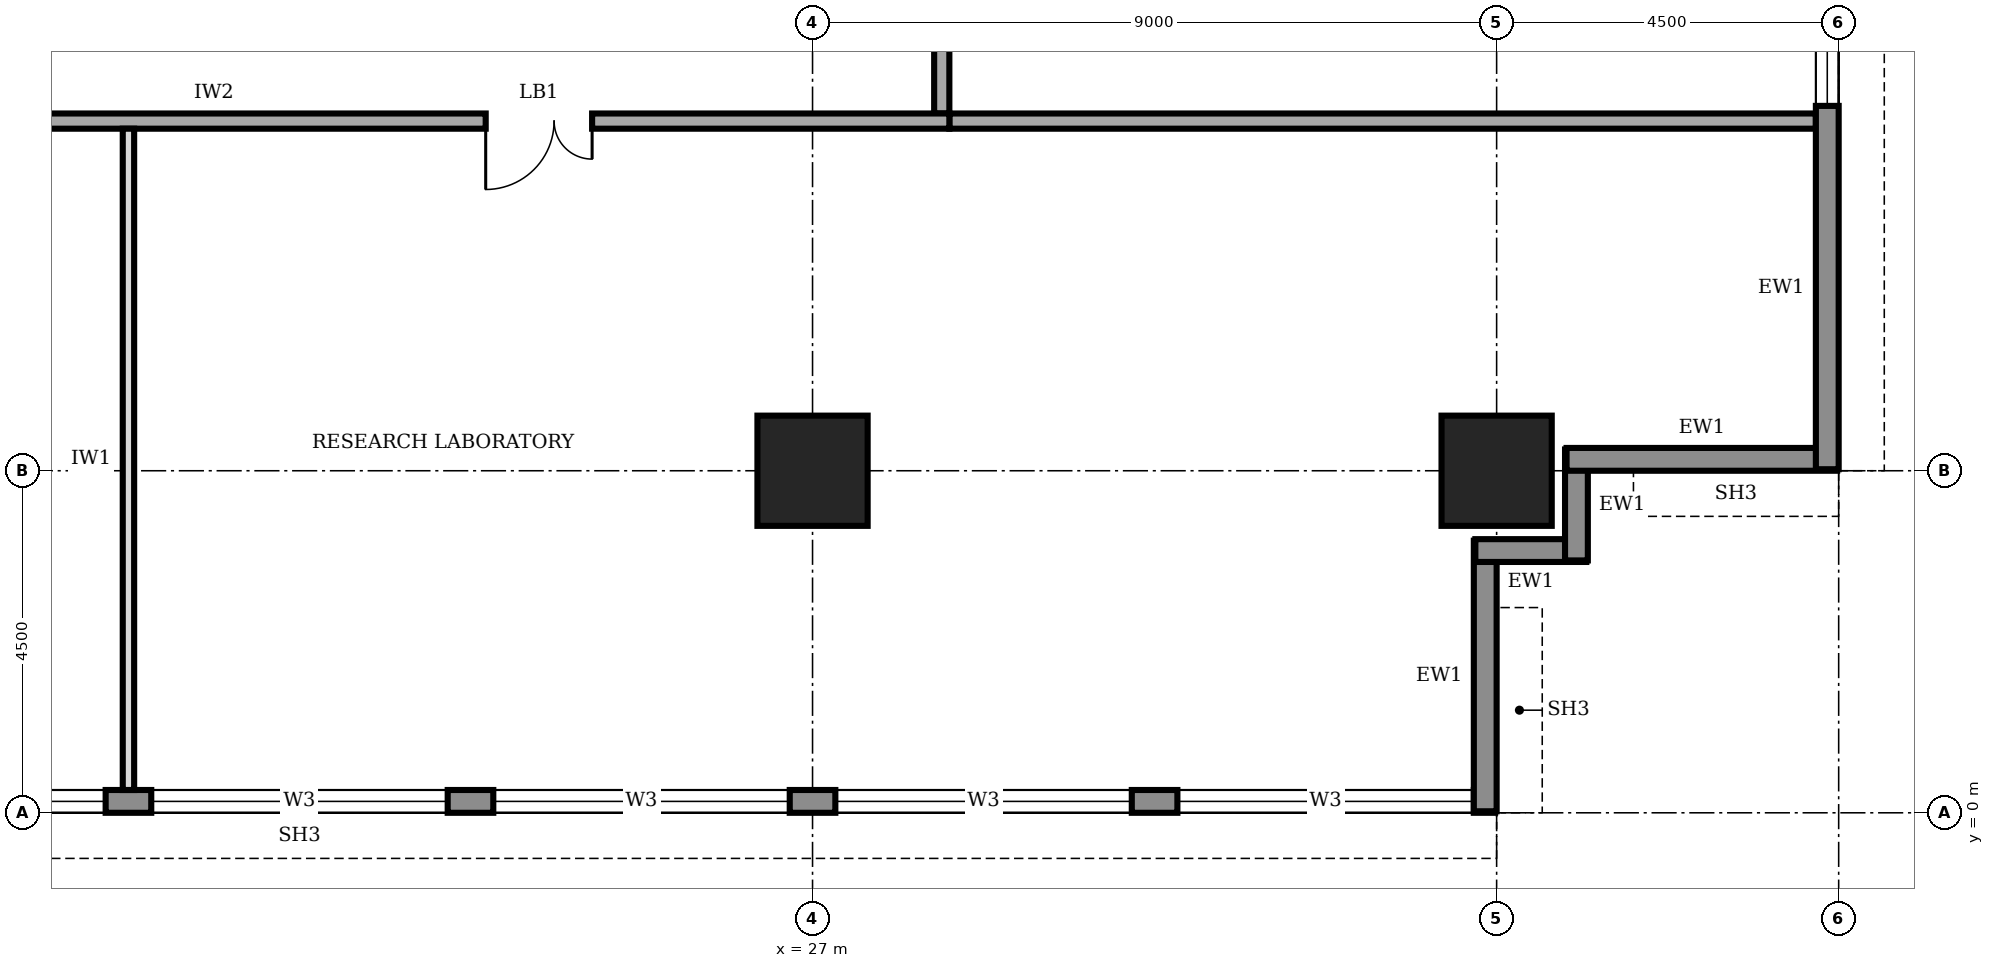
"""IFC4 building model, lengths in metres.
Left out: names, types, materials, properties, quantities, classifications, styles, units other than length and angle.
Written with IfcOpenShell. Run it as: python <this file> out.ifc"""

import sys

from ifc_helpers import new_model, si_unit, direction, frame, frame_2d, origin, origin_2d, place, context, subcontext, project, spatial, rectangle, extrude, element, fill, save


model = new_model("IFC4")
c1 = context("Model", 3, precision=1e-05, world=origin(), true_north=direction((0.0, 1.0)))
c2 = subcontext(c1, "Body", "Model", "MODEL_VIEW")
j1 = project(units=[si_unit("LENGTHUNIT", "METRE"), si_unit("PLANEANGLEUNIT", "RADIAN")], contexts=[c1])
p1 = place(None, origin())
s1 = spatial("IfcSite", under=j1, at=p1, CompositionType="ELEMENT")
p2 = place(p1, origin())
s2 = spatial("IfcBuilding", under=s1, at=p2, CompositionType="ELEMENT")
p3 = place(p2, frame((0.0, 0.0, 257.0)))
s3 = spatial("IfcBuildingStorey", under=s2, at=p3, CompositionType="ELEMENT", Elevation=257.0)
for number, where, z_axis, x_axis in (
    (1, (27.0, 4.5, 0.0), (0.0, 0.0, 1.0), (1.0, 0.0, 0.0)),
    (2, (36.0, 4.5, 0.0), (0.0, 0.0, 1.0), (1.0, 0.0, 0.0)),
):
    element("IfcColumn", number, at=place(p3, frame(where, z_axis=z_axis, x_axis=x_axis)), inside=s3, PredefinedType="COLUMN", context=c2, shape_type="SweptSolid", body=[
        extrude(rectangle(XDim=1.45, YDim=1.45, at=origin_2d()), origin(), (0.0, 0.0, 1.0), 4.0),
    ])
p4 = place(p3, frame((4.52, 0.15, 0.0), z_axis=(0.0, 0.0, 1.0), x_axis=(1.0, 0.0, 0.0)))
e3 = element("IfcWall", 3, at=p4, inside=s3, PredefinedType="STANDARD", context=c2, shape_type="SweptSolid", body=[
    extrude(rectangle(XDim=31.46, YDim=0.3, at=frame_2d((15.73, 0.0))), origin(), (0.0, 0.0, 1.0), 3.75),
])
p5 = place(p4, frame((4.78, 0.0, 0.95)))
e4 = element("IfcOpeningElement", 4, at=p5, cuts=e3, PredefinedType="OPENING", context=c2, shape_type="SweptSolid", body=[
    extrude(rectangle(XDim=3.9, YDim=1.8, at=frame_2d((1.95, 0.9))), frame((0.0, 0.16, 0.0), z_axis=(0.0, -1.0, 0.0), x_axis=(1.0, 0.0, 0.0)), (0.0, 0.0, 1.0), 0.32),
])
p6 = place(p4, frame((9.28, 0.0, 0.95)))
e5 = element("IfcOpeningElement", 5, at=p6, cuts=e3, PredefinedType="OPENING", context=c2, shape_type="SweptSolid", body=[
    extrude(rectangle(XDim=3.9, YDim=1.8, at=frame_2d((1.95, 0.9))), frame((0.0, 0.16, 0.0), z_axis=(0.0, -1.0, 0.0), x_axis=(1.0, 0.0, 0.0)), (0.0, 0.0, 1.0), 0.32),
])
p7 = place(p4, frame((13.78, 0.0, 0.95)))
e6 = element("IfcOpeningElement", 6, at=p7, cuts=e3, PredefinedType="OPENING", context=c2, shape_type="SweptSolid", body=[
    extrude(rectangle(XDim=3.9, YDim=1.8, at=frame_2d((1.95, 0.9))), frame((0.0, 0.16, 0.0), z_axis=(0.0, -1.0, 0.0), x_axis=(1.0, 0.0, 0.0)), (0.0, 0.0, 1.0), 0.32),
])
p8 = place(p4, frame((18.28, 0.0, 0.95)))
e7 = element("IfcOpeningElement", 7, at=p8, cuts=e3, PredefinedType="OPENING", context=c2, shape_type="SweptSolid", body=[
    extrude(rectangle(XDim=3.9, YDim=1.8, at=frame_2d((1.95, 0.9))), frame((0.0, 0.16, 0.0), z_axis=(0.0, -1.0, 0.0), x_axis=(1.0, 0.0, 0.0)), (0.0, 0.0, 1.0), 0.32),
])
p9 = place(p4, frame((22.78, 0.0, 0.95)))
e8 = element("IfcOpeningElement", 8, at=p9, cuts=e3, PredefinedType="OPENING", context=c2, shape_type="SweptSolid", body=[
    extrude(rectangle(XDim=3.9, YDim=1.8, at=frame_2d((1.95, 0.9))), frame((0.0, 0.16, 0.0), z_axis=(0.0, -1.0, 0.0), x_axis=(1.0, 0.0, 0.0)), (0.0, 0.0, 1.0), 0.32),
])
p10 = place(p4, frame((27.28, 0.0, 0.95)))
e9 = element("IfcOpeningElement", 9, at=p10, cuts=e3, PredefinedType="OPENING", context=c2, shape_type="SweptSolid", body=[
    extrude(rectangle(XDim=3.9, YDim=1.8, at=frame_2d((1.95, 0.9))), frame((0.0, 0.16, 0.0), z_axis=(0.0, -1.0, 0.0), x_axis=(1.0, 0.0, 0.0)), (0.0, 0.0, 1.0), 0.32),
])
p11 = place(p3, frame((35.85, 0.02, 0.0), z_axis=(0.0, 0.0, 1.0), x_axis=(0.0, 1.0, 0.0)))
e10 = element("IfcWall", 10, at=p11, inside=s3, PredefinedType="STANDARD", context=c2, shape_type="SweptSolid", body=[
    extrude(rectangle(XDim=3.56, YDim=0.3, at=frame_2d((1.78, 0.0))), origin(), (0.0, 0.0, 1.0), 2.85),
])
for number, where, z_axis, x_axis in (
    (11, (35.72, 3.45, 0.0), (0.0, 0.0, 1.0), (1.0, 0.0, 0.0)),
    (12, (37.05, 3.32, 0.0), (0.0, 0.0, 1.0), (0.0, 1.0, 0.0)),
):
    element("IfcWall", number, at=place(p3, frame(where, z_axis=z_axis, x_axis=x_axis)), inside=s3, PredefinedType="STANDARD", context=c2, shape_type="SweptSolid", body=[
        extrude(rectangle(XDim=1.46, YDim=0.3, at=frame_2d((0.73, 0.0))), origin(), (0.0, 0.0, 1.0), 3.75),
    ])
p12 = place(p3, frame((36.92, 4.65, 0.0), z_axis=(0.0, 0.0, 1.0), x_axis=(1.0, 0.0, 0.0)))
e13 = element("IfcWall", 13, at=p12, inside=s3, PredefinedType="STANDARD", context=c2, shape_type="SweptSolid", body=[
    extrude(rectangle(XDim=3.56, YDim=0.3, at=frame_2d((1.78, 0.0))), origin(), (0.0, 0.0, 1.0), 2.85),
])
p13 = place(p3, frame((40.35, 4.52, 0.0), z_axis=(0.0, 0.0, 1.0), x_axis=(0.0, 1.0, 0.0)))
e14 = element("IfcWall", 14, at=p13, inside=s3, PredefinedType="STANDARD", context=c2, shape_type="SweptSolid", body=[
    extrude(rectangle(XDim=31.46, YDim=0.3, at=frame_2d((15.73, 0.0))), origin(), (0.0, 0.0, 1.0), 3.75),
])
p14 = place(p13, frame((4.78, 0.0, 0.95)))
e15 = element("IfcOpeningElement", 15, at=p14, cuts=e14, PredefinedType="OPENING", context=c2, shape_type="SweptSolid", body=[
    extrude(rectangle(XDim=3.9, YDim=1.8, at=frame_2d((1.95, 0.9))), frame((0.0, 0.16, 0.0), z_axis=(0.0, -1.0, 0.0), x_axis=(1.0, 0.0, 0.0)), (0.0, 0.0, 1.0), 0.32),
])
p15 = place(p13, frame((9.28, 0.0, 0.95)))
e16 = element("IfcOpeningElement", 16, at=p15, cuts=e14, PredefinedType="OPENING", context=c2, shape_type="SweptSolid", body=[
    extrude(rectangle(XDim=3.9, YDim=1.8, at=frame_2d((1.95, 0.9))), frame((0.0, 0.16, 0.0), z_axis=(0.0, -1.0, 0.0), x_axis=(1.0, 0.0, 0.0)), (0.0, 0.0, 1.0), 0.32),
])
p16 = place(p13, frame((13.78, 0.0, 0.95)))
e17 = element("IfcOpeningElement", 17, at=p16, cuts=e14, PredefinedType="OPENING", context=c2, shape_type="SweptSolid", body=[
    extrude(rectangle(XDim=3.9, YDim=1.8, at=frame_2d((1.95, 0.9))), frame((0.0, 0.16, 0.0), z_axis=(0.0, -1.0, 0.0), x_axis=(1.0, 0.0, 0.0)), (0.0, 0.0, 1.0), 0.32),
])
p17 = place(p13, frame((18.28, 0.0, 0.95)))
e18 = element("IfcOpeningElement", 18, at=p17, cuts=e14, PredefinedType="OPENING", context=c2, shape_type="SweptSolid", body=[
    extrude(rectangle(XDim=3.9, YDim=1.8, at=frame_2d((1.95, 0.9))), frame((0.0, 0.16, 0.0), z_axis=(0.0, -1.0, 0.0), x_axis=(1.0, 0.0, 0.0)), (0.0, 0.0, 1.0), 0.32),
])
p18 = place(p13, frame((22.78, 0.0, 0.95)))
e19 = element("IfcOpeningElement", 19, at=p18, cuts=e14, PredefinedType="OPENING", context=c2, shape_type="SweptSolid", body=[
    extrude(rectangle(XDim=3.9, YDim=1.8, at=frame_2d((1.95, 0.9))), frame((0.0, 0.16, 0.0), z_axis=(0.0, -1.0, 0.0), x_axis=(1.0, 0.0, 0.0)), (0.0, 0.0, 1.0), 0.32),
])
p19 = place(p13, frame((27.28, 0.0, 0.95)))
e20 = element("IfcOpeningElement", 20, at=p19, cuts=e14, PredefinedType="OPENING", context=c2, shape_type="SweptSolid", body=[
    extrude(rectangle(XDim=3.9, YDim=1.8, at=frame_2d((1.95, 0.9))), frame((0.0, 0.16, 0.0), z_axis=(0.0, -1.0, 0.0), x_axis=(1.0, 0.0, 0.0)), (0.0, 0.0, 1.0), 0.32),
])
p20 = place(p3, frame((11.9, 9.1, 0.0), z_axis=(0.0, 0.0, 1.0), x_axis=(1.0, 0.0, 0.0)))
e21 = element("IfcWall", 21, at=p20, inside=s3, PredefinedType="SOLIDWALL", context=c2, shape_type="SweptSolid", body=[
    extrude(rectangle(XDim=16.9, YDim=0.2, at=frame_2d((8.45, 0.0))), origin(), (0.0, 0.0, 1.0), 3.75),
])
p21 = place(p20, frame((2.25, 0.0, 0.0)))
e22 = element("IfcOpeningElement", 22, at=p21, cuts=e21, PredefinedType="OPENING", context=c2, shape_type="SweptSolid", body=[
    extrude(rectangle(XDim=1.4, YDim=2.1, at=frame_2d((0.7, 1.05))), frame((0.0, 0.11, 0.0), z_axis=(0.0, -1.0, 0.0), x_axis=(1.0, 0.0, 0.0)), (0.0, 0.0, 1.0), 0.22),
])
p22 = place(p20, frame((10.8, 0.0, 0.0)))
e23 = element("IfcOpeningElement", 23, at=p22, cuts=e21, PredefinedType="OPENING", context=c2, shape_type="SweptSolid", body=[
    extrude(rectangle(XDim=1.4, YDim=2.1, at=frame_2d((0.7, 1.05))), frame((0.0, 0.11, 0.0), z_axis=(0.0, -1.0, 0.0), x_axis=(1.0, 0.0, 0.0)), (0.0, 0.0, 1.0), 0.22),
])
p23 = place(p3, frame((28.7, 9.2, 0.0), z_axis=(0.0, 0.0, 1.0), x_axis=(0.0, 1.0, 0.0)))
e24 = element("IfcWall", 24, at=p23, inside=s3, PredefinedType="SOLIDWALL", context=c2, shape_type="SweptSolid", body=[
    extrude(rectangle(XDim=22.3, YDim=0.2, at=frame_2d((11.15, 0.0))), origin(), (0.0, 0.0, 1.0), 3.75),
])
p24 = place(p23, frame((1.55, 0.0, 0.0)))
e25 = element("IfcOpeningElement", 25, at=p24, cuts=e24, PredefinedType="OPENING", context=c2, shape_type="SweptSolid", body=[
    extrude(rectangle(XDim=1.0, YDim=2.1, at=frame_2d((0.5, 1.05))), frame((0.0, 0.11, 0.0), z_axis=(0.0, -1.0, 0.0), x_axis=(1.0, 0.0, 0.0)), (0.0, 0.0, 1.0), 0.22),
])
p25 = place(p23, frame((6.05, 0.0, 0.0)))
e26 = element("IfcOpeningElement", 26, at=p25, cuts=e24, PredefinedType="OPENING", context=c2, shape_type="SweptSolid", body=[
    extrude(rectangle(XDim=1.0, YDim=2.1, at=frame_2d((0.5, 1.05))), frame((0.0, 0.11, 0.0), z_axis=(0.0, -1.0, 0.0), x_axis=(1.0, 0.0, 0.0)), (0.0, 0.0, 1.0), 0.22),
])
p26 = place(p23, frame((10.55, 0.0, 0.0)))
e27 = element("IfcOpeningElement", 27, at=p26, cuts=e24, PredefinedType="OPENING", context=c2, shape_type="SweptSolid", body=[
    extrude(rectangle(XDim=1.0, YDim=2.1, at=frame_2d((0.5, 1.05))), frame((0.0, 0.11, 0.0), z_axis=(0.0, -1.0, 0.0), x_axis=(1.0, 0.0, 0.0)), (0.0, 0.0, 1.0), 0.22),
])
p27 = place(p23, frame((15.05, 0.0, 0.0)))
e28 = element("IfcOpeningElement", 28, at=p27, cuts=e24, PredefinedType="OPENING", context=c2, shape_type="SweptSolid", body=[
    extrude(rectangle(XDim=1.0, YDim=2.1, at=frame_2d((0.5, 1.05))), frame((0.0, 0.11, 0.0), z_axis=(0.0, -1.0, 0.0), x_axis=(1.0, 0.0, 0.0)), (0.0, 0.0, 1.0), 0.22),
])
p28 = place(p23, frame((19.55, 0.0, 0.0)))
e29 = element("IfcOpeningElement", 29, at=p28, cuts=e24, PredefinedType="OPENING", context=c2, shape_type="SweptSolid", body=[
    extrude(rectangle(XDim=1.0, YDim=2.1, at=frame_2d((0.5, 1.05))), frame((0.0, 0.11, 0.0), z_axis=(0.0, -1.0, 0.0), x_axis=(1.0, 0.0, 0.0)), (0.0, 0.0, 1.0), 0.22),
])
p29 = place(p3, frame((28.8, 9.1, 0.0), z_axis=(0.0, 0.0, 1.0), x_axis=(1.0, 0.0, 0.0)))
e30 = element("IfcWall", 30, at=p29, inside=s3, PredefinedType="SOLIDWALL", context=c2, shape_type="SweptSolid", body=[
    extrude(rectangle(XDim=11.4, YDim=0.2, at=frame_2d((5.7, 0.0))), origin(), (0.0, 0.0, 1.0), 3.75),
])
p30 = place(p3, frame((18.0, 0.3, 0.0), z_axis=(0.0, 0.0, 1.0), x_axis=(0.0, 1.0, 0.0)))
e31 = element("IfcWall", 31, at=p30, inside=s3, PredefinedType="PARTITIONING", context=c2, shape_type="SweptSolid", body=[
    extrude(rectangle(XDim=8.7, YDim=0.15, at=frame_2d((4.35, 0.0))), origin(), (0.0, 0.0, 1.0), 3.75),
])
p31 = place(p6, origin())
e32 = element("IfcWindow", 32, at=p31, inside=s3, PartitioningType="SINGLE_PANEL", PredefinedType="WINDOW", context=c2, shape_type="SweptSolid", body=[
    extrude(rectangle(XDim=3.9, YDim=1.8, at=frame_2d((1.95, 0.9))), frame((0.0, 0.03, 0.0), z_axis=(0.0, -1.0, 0.0), x_axis=(1.0, 0.0, 0.0)), (0.0, 0.0, 1.0), 0.06),
])
fill(e5, e32)
p32 = place(p7, origin())
e33 = element("IfcWindow", 33, at=p32, inside=s3, PartitioningType="SINGLE_PANEL", PredefinedType="WINDOW", context=c2, shape_type="SweptSolid", body=[
    extrude(rectangle(XDim=3.9, YDim=1.8, at=frame_2d((1.95, 0.9))), frame((0.0, 0.03, 0.0), z_axis=(0.0, -1.0, 0.0), x_axis=(1.0, 0.0, 0.0)), (0.0, 0.0, 1.0), 0.06),
])
fill(e6, e33)
p33 = place(p8, origin())
e34 = element("IfcWindow", 34, at=p33, inside=s3, PartitioningType="SINGLE_PANEL", PredefinedType="WINDOW", context=c2, shape_type="SweptSolid", body=[
    extrude(rectangle(XDim=3.9, YDim=1.8, at=frame_2d((1.95, 0.9))), frame((0.0, 0.03, 0.0), z_axis=(0.0, -1.0, 0.0), x_axis=(1.0, 0.0, 0.0)), (0.0, 0.0, 1.0), 0.06),
])
fill(e7, e34)
p34 = place(p9, origin())
e35 = element("IfcWindow", 35, at=p34, inside=s3, PartitioningType="SINGLE_PANEL", PredefinedType="WINDOW", context=c2, shape_type="SweptSolid", body=[
    extrude(rectangle(XDim=3.9, YDim=1.8, at=frame_2d((1.95, 0.9))), frame((0.0, 0.03, 0.0), z_axis=(0.0, -1.0, 0.0), x_axis=(1.0, 0.0, 0.0)), (0.0, 0.0, 1.0), 0.06),
])
fill(e8, e35)
p35 = place(p10, origin())
e36 = element("IfcWindow", 36, at=p35, inside=s3, PartitioningType="SINGLE_PANEL", PredefinedType="WINDOW", context=c2, shape_type="SweptSolid", body=[
    extrude(rectangle(XDim=3.9, YDim=1.8, at=frame_2d((1.95, 0.9))), frame((0.0, 0.03, 0.0), z_axis=(0.0, -1.0, 0.0), x_axis=(1.0, 0.0, 0.0)), (0.0, 0.0, 1.0), 0.06),
])
fill(e9, e36)
p36 = place(p14, origin())
e37 = element("IfcWindow", 37, at=p36, inside=s3, PartitioningType="SINGLE_PANEL", PredefinedType="WINDOW", context=c2, shape_type="SweptSolid", body=[
    extrude(rectangle(XDim=3.9, YDim=1.8, at=frame_2d((1.95, 0.9))), frame((0.0, 0.03, 0.0), z_axis=(0.0, -1.0, 0.0), x_axis=(1.0, 0.0, 0.0)), (0.0, 0.0, 1.0), 0.06),
])
fill(e15, e37)
p37 = place(p22, frame((1.4, 0.0, 0.0), z_axis=(0.0, 0.0, 1.0), x_axis=(-1.0, 0.0, 0.0)))
e38 = element("IfcDoor", 38, at=p37, inside=s3, OperationType="DOUBLE_DOOR_SINGLE_SWING", PredefinedType="DOOR", context=c2, shape_type="SweptSolid", body=[
    extrude(rectangle(XDim=1.4, YDim=2.1, at=frame_2d((0.7, 1.05))), frame((0.0, 0.025, 0.0), z_axis=(0.0, -1.0, 0.0), x_axis=(1.0, 0.0, 0.0)), (0.0, 0.0, 1.0), 0.05),
])
fill(e23, e38)
save(model, sys.argv[1])
